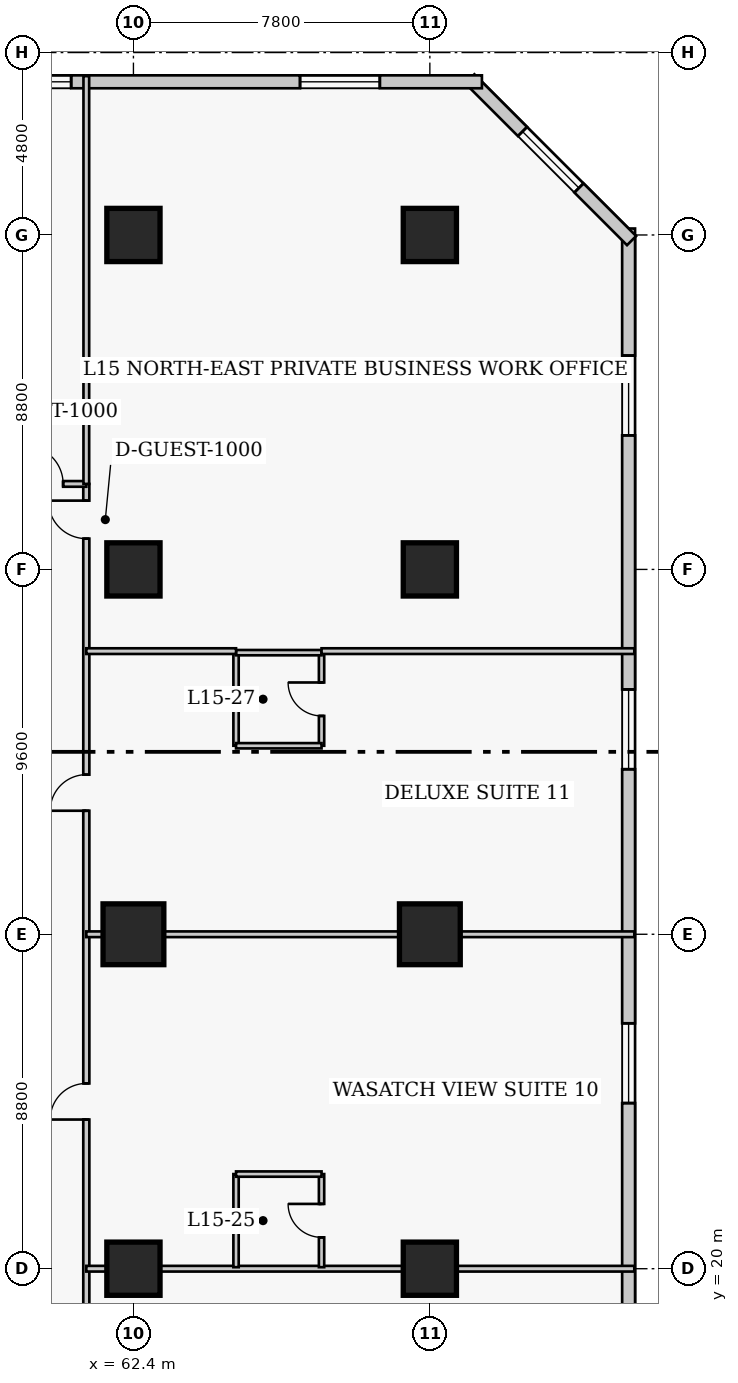
"""IFC4 building model, lengths in metres.
Left out: names, types, materials, properties, quantities, classifications, styles, units other than length and angle.
Written with IfcOpenShell. Run it as: python <this file> out.ifc"""

import sys

from ifc_helpers import new_model, si_unit, direction, frame, frame_2d, origin, origin_2d, place, context, subcontext, project, spatial, rectangle, extrude, element, fill, save


model = new_model("IFC4")
c1 = context("Model", 3, precision=1e-05, world=origin(), true_north=direction((0.0, 1.0)))
c2 = subcontext(c1, "Body", "Model", "MODEL_VIEW")
j1 = project(units=[si_unit("LENGTHUNIT", "METRE"), si_unit("PLANEANGLEUNIT", "RADIAN")], contexts=[c1])
p1 = place(None, origin())
s1 = spatial("IfcSite", under=j1, at=p1, CompositionType="ELEMENT")
p2 = place(p1, origin())
s2 = spatial("IfcBuilding", under=s1, at=p2, CompositionType="ELEMENT")
p3 = place(p2, frame((0.0, 0.0, 64.0)))
s3 = spatial("IfcBuildingStorey", under=s2, at=p3, CompositionType="ELEMENT", Elevation=64.0)
p4 = place(p3, frame((62.4, 20.0, 0.0), z_axis=(0.0, 0.0, 1.0), x_axis=(1.0, 0.0, 0.0)))
e1 = element("IfcColumn", 1, at=p4, inside=s3, PredefinedType="COLUMN", context=c2, shape_type="SweptSolid", body=[
    extrude(rectangle(XDim=1.4, YDim=1.4, at=origin_2d()), origin(), (0.0, 0.0, 1.0), 3.8),
])
p5 = place(p3, frame((62.4, 28.8, 0.0), z_axis=(0.0, 0.0, 1.0), x_axis=(1.0, 0.0, 0.0)))
e2 = element("IfcColumn", 2, at=p5, inside=s3, PredefinedType="COLUMN", context=c2, shape_type="SweptSolid", body=[
    extrude(rectangle(XDim=1.6, YDim=1.6, at=origin_2d()), origin(), (0.0, 0.0, 1.0), 3.8),
])
for number, where, z_axis, x_axis in (
    (3, (62.4, 38.4, 0.0), (0.0, 0.0, 1.0), (1.0, 0.0, 0.0)),
    (4, (62.4, 47.2, 0.0), (0.0, 0.0, 1.0), (1.0, 0.0, 0.0)),
    (5, (70.2, 20.0, 0.0), (0.0, 0.0, 1.0), (1.0, 0.0, 0.0)),
):
    element("IfcColumn", number, at=place(p3, frame(where, z_axis=z_axis, x_axis=x_axis)), inside=s3, PredefinedType="COLUMN", context=c2, shape_type="SweptSolid", body=[
        extrude(rectangle(XDim=1.4, YDim=1.4, at=origin_2d()), origin(), (0.0, 0.0, 1.0), 3.8),
    ])
p6 = place(p3, frame((70.2, 28.8, 0.0), z_axis=(0.0, 0.0, 1.0), x_axis=(1.0, 0.0, 0.0)))
e6 = element("IfcColumn", 6, at=p6, inside=s3, PredefinedType="COLUMN", context=c2, shape_type="SweptSolid", body=[
    extrude(rectangle(XDim=1.6, YDim=1.6, at=origin_2d()), origin(), (0.0, 0.0, 1.0), 3.8),
])
for number, where, z_axis, x_axis in (
    (7, (70.2, 38.4, 0.0), (0.0, 0.0, 1.0), (1.0, 0.0, 0.0)),
    (8, (70.2, 47.2, 0.0), (0.0, 0.0, 1.0), (1.0, 0.0, 0.0)),
):
    element("IfcColumn", number, at=place(p3, frame(where, z_axis=z_axis, x_axis=x_axis)), inside=s3, PredefinedType="COLUMN", context=c2, shape_type="SweptSolid", body=[
        extrude(rectangle(XDim=1.4, YDim=1.4, at=origin_2d()), origin(), (0.0, 0.0, 1.0), 3.8),
    ])
p7 = place(p3, frame((75.43, 12.23, 0.0), z_axis=(0.0, 0.0, 1.0), x_axis=(0.0, 1.0, 0.0)))
e9 = element("IfcWall", 9, at=p7, inside=s3, PredefinedType="SOLIDWALL", context=c2, shape_type="SweptSolid", body=[
    extrude(rectangle(XDim=35.14, YDim=0.34, at=frame_2d((17.57, 0.0))), origin(), (0.0, 0.0, 1.0), 3.54),
])
p8 = place(p7, frame((3.343, 0.0, 0.85)))
e10 = element("IfcOpeningElement", 10, at=p8, cuts=e9, PredefinedType="OPENING", context=c2, shape_type="SweptSolid", body=[
    extrude(rectangle(XDim=2.1, YDim=1.85, at=frame_2d((1.05, 0.925))), frame((0.0, 0.18, 0.0), z_axis=(0.0, -1.0, 0.0), x_axis=(1.0, 0.0, 0.0)), (0.0, 0.0, 1.0), 0.36),
])
p9 = place(p7, frame((12.127, 0.0, 0.85)))
e11 = element("IfcOpeningElement", 11, at=p9, cuts=e9, PredefinedType="OPENING", context=c2, shape_type="SweptSolid", body=[
    extrude(rectangle(XDim=2.1, YDim=1.85, at=frame_2d((1.05, 0.925))), frame((0.0, 0.18, 0.0), z_axis=(0.0, -1.0, 0.0), x_axis=(1.0, 0.0, 0.0)), (0.0, 0.0, 1.0), 0.36),
])
p10 = place(p7, frame((20.913, 0.0, 0.85)))
e12 = element("IfcOpeningElement", 12, at=p10, cuts=e9, PredefinedType="OPENING", context=c2, shape_type="SweptSolid", body=[
    extrude(rectangle(XDim=2.1, YDim=1.85, at=frame_2d((1.05, 0.925))), frame((0.0, 0.18, 0.0), z_axis=(0.0, -1.0, 0.0), x_axis=(1.0, 0.0, 0.0)), (0.0, 0.0, 1.0), 0.36),
])
p11 = place(p7, frame((29.698, 0.0, 0.85)))
e13 = element("IfcOpeningElement", 13, at=p11, cuts=e9, PredefinedType="OPENING", context=c2, shape_type="SweptSolid", body=[
    extrude(rectangle(XDim=2.1, YDim=1.85, at=frame_2d((1.05, 0.925))), frame((0.0, 0.18, 0.0), z_axis=(0.0, -1.0, 0.0), x_axis=(1.0, 0.0, 0.0)), (0.0, 0.0, 1.0), 0.36),
])
p12 = place(p3, frame((75.508, 47.052, 0.0), z_axis=(0.0, 0.0, 1.0), x_axis=(-0.707106781187, 0.707106781187, 0.0)))
e14 = element("IfcWall", 14, at=p12, inside=s3, PredefinedType="SOLIDWALL", context=c2, shape_type="SweptSolid", body=[
    extrude(rectangle(XDim=6.02, YDim=0.34, at=frame_2d((3.01, 0.0))), origin(), (0.0, 0.0, 1.0), 3.54),
])
p13 = place(p12, frame((1.96, 0.0, 0.85)))
e15 = element("IfcOpeningElement", 15, at=p13, cuts=e14, PredefinedType="OPENING", context=c2, shape_type="SweptSolid", body=[
    extrude(rectangle(XDim=2.1, YDim=1.85, at=frame_2d((1.05, 0.925))), frame((0.0, 0.18, 0.0), z_axis=(0.0, -1.0, 0.0), x_axis=(1.0, 0.0, 0.0)), (0.0, 0.0, 1.0), 0.36),
])
p14 = place(p3, frame((71.57, 51.23, 0.0), z_axis=(0.0, 0.0, 1.0), x_axis=(-1.0, 0.0, 0.0)))
e16 = element("IfcWall", 16, at=p14, inside=s3, PredefinedType="SOLIDWALL", context=c2, shape_type="SweptSolid", body=[
    extrude(rectangle(XDim=29.89, YDim=0.34, at=frame_2d((14.945, 0.0))), origin(), (0.0, 0.0, 1.0), 3.54),
])
p15 = place(p14, frame((2.686, 0.0, 0.85)))
e17 = element("IfcOpeningElement", 17, at=p15, cuts=e16, PredefinedType="OPENING", context=c2, shape_type="SweptSolid", body=[
    extrude(rectangle(XDim=2.1, YDim=1.85, at=frame_2d((1.05, 0.925))), frame((0.0, 0.18, 0.0), z_axis=(0.0, -1.0, 0.0), x_axis=(1.0, 0.0, 0.0)), (0.0, 0.0, 1.0), 0.36),
])
p16 = place(p14, frame((10.809, 0.0, 0.85)))
e18 = element("IfcOpeningElement", 18, at=p16, cuts=e16, PredefinedType="OPENING", context=c2, shape_type="SweptSolid", body=[
    extrude(rectangle(XDim=2.1, YDim=1.85, at=frame_2d((1.05, 0.925))), frame((0.0, 0.18, 0.0), z_axis=(0.0, -1.0, 0.0), x_axis=(1.0, 0.0, 0.0)), (0.0, 0.0, 1.0), 0.36),
])
p17 = place(p14, frame((17.631, 0.0, 0.85)))
e19 = element("IfcOpeningElement", 19, at=p17, cuts=e16, PredefinedType="OPENING", context=c2, shape_type="SweptSolid", body=[
    extrude(rectangle(XDim=2.1, YDim=1.85, at=frame_2d((1.05, 0.925))), frame((0.0, 0.18, 0.0), z_axis=(0.0, -1.0, 0.0), x_axis=(1.0, 0.0, 0.0)), (0.0, 0.0, 1.0), 0.36),
])
p18 = place(p14, frame((25.104, 0.0, 0.85)))
e20 = element("IfcOpeningElement", 20, at=p18, cuts=e16, PredefinedType="OPENING", context=c2, shape_type="SweptSolid", body=[
    extrude(rectangle(XDim=2.1, YDim=1.85, at=frame_2d((1.05, 0.925))), frame((0.0, 0.18, 0.0), z_axis=(0.0, -1.0, 0.0), x_axis=(1.0, 0.0, 0.0)), (0.0, 0.0, 1.0), 0.36),
])
p19 = place(p3, frame((61.16, 10.25, 0.0), z_axis=(0.0, 0.0, 1.0), x_axis=(0.0, 1.0, 0.0)))
e21 = element("IfcWall", 21, at=p19, inside=s3, PredefinedType="PARTITIONING", context=c2, shape_type="SweptSolid", body=[
    extrude(rectangle(XDim=30.4, YDim=0.16, at=frame_2d((15.2, 0.0))), origin(), (0.0, 0.0, 1.0), 3.54),
])
p20 = place(p19, frame((4.4, 0.0, 0.0)))
e22 = element("IfcOpeningElement", 22, at=p20, cuts=e21, PredefinedType="OPENING", context=c2, shape_type="SweptSolid", body=[
    extrude(rectangle(XDim=0.95, YDim=2.1, at=frame_2d((0.475, 1.05))), frame((0.0, 0.09, 0.0), z_axis=(0.0, -1.0, 0.0), x_axis=(1.0, 0.0, 0.0)), (0.0, 0.0, 1.0), 0.18),
])
p21 = place(p19, frame((13.675, 0.0, 0.0)))
e23 = element("IfcOpeningElement", 23, at=p21, cuts=e21, PredefinedType="OPENING", context=c2, shape_type="SweptSolid", body=[
    extrude(rectangle(XDim=0.95, YDim=2.1, at=frame_2d((0.475, 1.05))), frame((0.0, 0.09, 0.0), z_axis=(0.0, -1.0, 0.0), x_axis=(1.0, 0.0, 0.0)), (0.0, 0.0, 1.0), 0.18),
])
p22 = place(p19, frame((21.8, 0.0, 0.0)))
e24 = element("IfcOpeningElement", 24, at=p22, cuts=e21, PredefinedType="OPENING", context=c2, shape_type="SweptSolid", body=[
    extrude(rectangle(XDim=0.95, YDim=2.1, at=frame_2d((0.475, 1.05))), frame((0.0, 0.09, 0.0), z_axis=(0.0, -1.0, 0.0), x_axis=(1.0, 0.0, 0.0)), (0.0, 0.0, 1.0), 0.18),
])
p23 = place(p19, frame((28.96, 0.0, 0.0)))
e25 = element("IfcOpeningElement", 25, at=p23, cuts=e21, PredefinedType="OPENING", context=c2, shape_type="SweptSolid", body=[
    extrude(rectangle(XDim=1.0, YDim=2.15, at=frame_2d((0.5, 1.075))), frame((0.0, 0.09, 0.0), z_axis=(0.0, -1.0, 0.0), x_axis=(1.0, 0.0, 0.0)), (0.0, 0.0, 1.0), 0.18),
])
p24 = place(p3, frame((56.8, 40.65, 0.0), z_axis=(0.0, 0.0, 1.0), x_axis=(1.0, 0.0, 0.0)))
e26 = element("IfcWall", 26, at=p24, inside=s3, PredefinedType="PARTITIONING", context=c2, shape_type="SweptSolid", body=[
    extrude(rectangle(XDim=4.36, YDim=0.15, at=frame_2d((2.18, 0.0))), origin(), (0.0, 0.0, 1.0), 3.54),
])
p25 = place(p24, frame((2.75, 0.0, 0.0)))
e27 = element("IfcOpeningElement", 27, at=p25, cuts=e26, PredefinedType="OPENING", context=c2, shape_type="SweptSolid", body=[
    extrude(rectangle(XDim=1.0, YDim=2.15, at=frame_2d((0.5, 1.075))), frame((0.0, 0.085, 0.0), z_axis=(0.0, -1.0, 0.0), x_axis=(1.0, 0.0, 0.0)), (0.0, 0.0, 1.0), 0.17),
])
p26 = place(p3, frame((61.16, 40.65, 0.0), z_axis=(0.0, 0.0, 1.0), x_axis=(0.0, 1.0, 0.0)))
e28 = element("IfcWall", 28, at=p26, inside=s3, PredefinedType="PARTITIONING", context=c2, shape_type="SweptSolid", body=[
    extrude(rectangle(XDim=10.73, YDim=0.15, at=frame_2d((5.365, 0.0))), origin(), (0.0, 0.0, 1.0), 3.54),
])
p27 = place(p3, frame((61.16, 20.0, 0.0), z_axis=(0.0, 0.0, 1.0), x_axis=(1.0, 0.0, 0.0)))
e29 = element("IfcWall", 29, at=p27, inside=s3, PredefinedType="PARTITIONING", context=c2, shape_type="SweptSolid", body=[
    extrude(rectangle(XDim=14.42, YDim=0.15, at=frame_2d((7.21, 0.0))), origin(), (0.0, 0.0, 1.0), 2.593),
])
p28 = place(p3, frame((65.1, 20.04, 0.0), z_axis=(0.0, 0.0, 1.0), x_axis=(0.0, 1.0, 0.0)))
e30 = element("IfcWall", 30, at=p28, inside=s3, PredefinedType="PLUMBINGWALL", context=c2, shape_type="SweptSolid", body=[
    extrude(rectangle(XDim=2.45, YDim=0.14, at=frame_2d((1.225, 0.0))), origin(), (0.0, 0.0, 1.0), 3.54),
])
p29 = place(p3, frame((67.35, 20.04, 0.0), z_axis=(0.0, 0.0, 1.0), x_axis=(0.0, 1.0, 0.0)))
e31 = element("IfcWall", 31, at=p29, inside=s3, PredefinedType="PLUMBINGWALL", context=c2, shape_type="SweptSolid", body=[
    extrude(rectangle(XDim=2.45, YDim=0.14, at=frame_2d((1.225, 0.0))), origin(), (0.0, 0.0, 1.0), 3.54),
])
p30 = place(p29, frame((0.785, 0.0, 0.0)))
e32 = element("IfcOpeningElement", 32, at=p30, cuts=e31, PredefinedType="OPENING", context=c2, shape_type="SweptSolid", body=[
    extrude(rectangle(XDim=0.88, YDim=2.05, at=frame_2d((0.44, 1.025))), frame((0.0, 0.08, 0.0), z_axis=(0.0, -1.0, 0.0), x_axis=(1.0, 0.0, 0.0)), (0.0, 0.0, 1.0), 0.16),
])
p31 = place(p3, frame((65.1, 22.49, 0.0), z_axis=(0.0, 0.0, 1.0), x_axis=(1.0, 0.0, 0.0)))
e33 = element("IfcWall", 33, at=p31, inside=s3, PredefinedType="PLUMBINGWALL", context=c2, shape_type="SweptSolid", body=[
    extrude(rectangle(XDim=2.25, YDim=0.14, at=frame_2d((1.125, 0.0))), origin(), (0.0, 0.0, 1.0), 3.54),
])
p32 = place(p3, frame((61.16, 28.8, 0.0), z_axis=(0.0, 0.0, 1.0), x_axis=(1.0, 0.0, 0.0)))
e34 = element("IfcWall", 34, at=p32, inside=s3, PredefinedType="PARTITIONING", context=c2, shape_type="SweptSolid", body=[
    extrude(rectangle(XDim=14.42, YDim=0.15, at=frame_2d((7.21, 0.0))), origin(), (0.0, 0.0, 1.0), 2.593),
])
p33 = place(p3, frame((65.1, 33.76, 0.0), z_axis=(0.0, 0.0, 1.0), x_axis=(0.0, 1.0, 0.0)))
e35 = element("IfcWall", 35, at=p33, inside=s3, PredefinedType="PLUMBINGWALL", context=c2, shape_type="SweptSolid", body=[
    extrude(rectangle(XDim=2.45, YDim=0.14, at=frame_2d((1.225, 0.0))), origin(), (0.0, 0.0, 1.0), 3.54),
])
p34 = place(p3, frame((67.35, 33.76, 0.0), z_axis=(0.0, 0.0, 1.0), x_axis=(0.0, 1.0, 0.0)))
e36 = element("IfcWall", 36, at=p34, inside=s3, PredefinedType="PLUMBINGWALL", context=c2, shape_type="SweptSolid", body=[
    extrude(rectangle(XDim=2.45, YDim=0.14, at=frame_2d((1.225, 0.0))), origin(), (0.0, 0.0, 1.0), 3.54),
])
p35 = place(p34, frame((0.785, 0.0, 0.0)))
e37 = element("IfcOpeningElement", 37, at=p35, cuts=e36, PredefinedType="OPENING", context=c2, shape_type="SweptSolid", body=[
    extrude(rectangle(XDim=0.88, YDim=2.05, at=frame_2d((0.44, 1.025))), frame((0.0, 0.08, 0.0), z_axis=(0.0, -1.0, 0.0), x_axis=(1.0, 0.0, 0.0)), (0.0, 0.0, 1.0), 0.16),
])
for number, where, z_axis, x_axis in (
    (38, (65.1, 33.76, 0.0), (0.0, 0.0, 1.0), (1.0, 0.0, 0.0)),
    (39, (65.1, 36.21, 0.0), (0.0, 0.0, 1.0), (1.0, 0.0, 0.0)),
):
    element("IfcWall", number, at=place(p3, frame(where, z_axis=z_axis, x_axis=x_axis)), inside=s3, PredefinedType="PLUMBINGWALL", context=c2, shape_type="SweptSolid", body=[
        extrude(rectangle(XDim=2.25, YDim=0.14, at=frame_2d((1.125, 0.0))), origin(), (0.0, 0.0, 1.0), 3.54),
    ])
p36 = place(p3, frame((61.16, 36.25, 0.0), z_axis=(0.0, 0.0, 1.0), x_axis=(1.0, 0.0, 0.0)))
e40 = element("IfcWall", 40, at=p36, inside=s3, PredefinedType="PARTITIONING", context=c2, shape_type="SweptSolid", body=[
    extrude(rectangle(XDim=3.94, YDim=0.15, at=frame_2d((1.97, 0.0))), origin(), (0.0, 0.0, 1.0), 3.54),
])
p37 = place(p3, frame((67.35, 36.25, 0.0), z_axis=(0.0, 0.0, 1.0), x_axis=(1.0, 0.0, 0.0)))
e41 = element("IfcWall", 41, at=p37, inside=s3, PredefinedType="PARTITIONING", context=c2, shape_type="SweptSolid", body=[
    extrude(rectangle(XDim=8.23, YDim=0.15, at=frame_2d((4.115, 0.0))), origin(), (0.0, 0.0, 1.0), 3.54),
])
p38 = place(p9, origin())
e42 = element("IfcWindow", 42, at=p38, inside=s3, PartitioningType="SINGLE_PANEL", PredefinedType="WINDOW", context=c2, shape_type="SweptSolid", body=[
    extrude(rectangle(XDim=2.1, YDim=1.85, at=frame_2d((1.05, 0.925))), frame((0.0, 0.03, 0.0), z_axis=(0.0, -1.0, 0.0), x_axis=(1.0, 0.0, 0.0)), (0.0, 0.0, 1.0), 0.06),
])
fill(e11, e42)
p39 = place(p10, origin())
e43 = element("IfcWindow", 43, at=p39, inside=s3, PartitioningType="SINGLE_PANEL", PredefinedType="WINDOW", context=c2, shape_type="SweptSolid", body=[
    extrude(rectangle(XDim=2.1, YDim=1.85, at=frame_2d((1.05, 0.925))), frame((0.0, 0.03, 0.0), z_axis=(0.0, -1.0, 0.0), x_axis=(1.0, 0.0, 0.0)), (0.0, 0.0, 1.0), 0.06),
])
fill(e12, e43)
p40 = place(p11, origin())
e44 = element("IfcWindow", 44, at=p40, inside=s3, PartitioningType="SINGLE_PANEL", PredefinedType="WINDOW", context=c2, shape_type="SweptSolid", body=[
    extrude(rectangle(XDim=2.1, YDim=1.85, at=frame_2d((1.05, 0.925))), frame((0.0, 0.03, 0.0), z_axis=(0.0, -1.0, 0.0), x_axis=(1.0, 0.0, 0.0)), (0.0, 0.0, 1.0), 0.06),
])
fill(e13, e44)
p41 = place(p13, origin())
e45 = element("IfcWindow", 45, at=p41, inside=s3, PartitioningType="SINGLE_PANEL", PredefinedType="WINDOW", context=c2, shape_type="SweptSolid", body=[
    extrude(rectangle(XDim=2.1, YDim=1.85, at=frame_2d((1.05, 0.925))), frame((0.0, 0.03, 0.0), z_axis=(0.0, -1.0, 0.0), x_axis=(1.0, 0.0, 0.0)), (0.0, 0.0, 1.0), 0.06),
])
fill(e15, e45)
p42 = place(p15, origin())
e46 = element("IfcWindow", 46, at=p42, inside=s3, PartitioningType="SINGLE_PANEL", PredefinedType="WINDOW", context=c2, shape_type="SweptSolid", body=[
    extrude(rectangle(XDim=2.1, YDim=1.85, at=frame_2d((1.05, 0.925))), frame((0.0, 0.03, 0.0), z_axis=(0.0, -1.0, 0.0), x_axis=(1.0, 0.0, 0.0)), (0.0, 0.0, 1.0), 0.06),
])
fill(e17, e46)
p43 = place(p16, origin())
e47 = element("IfcWindow", 47, at=p43, inside=s3, PartitioningType="SINGLE_PANEL", PredefinedType="WINDOW", context=c2, shape_type="SweptSolid", body=[
    extrude(rectangle(XDim=2.1, YDim=1.85, at=frame_2d((1.05, 0.925))), frame((0.0, 0.03, 0.0), z_axis=(0.0, -1.0, 0.0), x_axis=(1.0, 0.0, 0.0)), (0.0, 0.0, 1.0), 0.06),
])
fill(e18, e47)
p44 = place(p25, origin())
e48 = element("IfcDoor", 48, at=p44, inside=s3, OperationType="SINGLE_SWING_LEFT", PredefinedType="DOOR", context=c2, shape_type="SweptSolid", body=[
    extrude(rectangle(XDim=1.0, YDim=2.15, at=frame_2d((0.5, 1.075))), frame((0.0, 0.025, 0.0), z_axis=(0.0, -1.0, 0.0), x_axis=(1.0, 0.0, 0.0)), (0.0, 0.0, 1.0), 0.05),
])
fill(e27, e48)
p45 = place(p30, origin())
e49 = element("IfcDoor", 49, at=p45, inside=s3, OperationType="SINGLE_SWING_RIGHT", PredefinedType="DOOR", context=c2, shape_type="SweptSolid", body=[
    extrude(rectangle(XDim=0.88, YDim=2.05, at=frame_2d((0.44, 1.025))), frame((0.0, 0.025, 0.0), z_axis=(0.0, -1.0, 0.0), x_axis=(1.0, 0.0, 0.0)), (0.0, 0.0, 1.0), 0.05),
])
fill(e32, e49)
p46 = place(p21, origin())
e50 = element("IfcDoor", 50, at=p46, inside=s3, OperationType="SINGLE_SWING_LEFT", PredefinedType="DOOR", context=c2, shape_type="SweptSolid", body=[
    extrude(rectangle(XDim=0.95, YDim=2.1, at=frame_2d((0.475, 1.05))), frame((0.0, 0.025, 0.0), z_axis=(0.0, -1.0, 0.0), x_axis=(1.0, 0.0, 0.0)), (0.0, 0.0, 1.0), 0.05),
])
fill(e23, e50)
p47 = place(p35, origin())
e51 = element("IfcDoor", 51, at=p47, inside=s3, OperationType="SINGLE_SWING_RIGHT", PredefinedType="DOOR", context=c2, shape_type="SweptSolid", body=[
    extrude(rectangle(XDim=0.88, YDim=2.05, at=frame_2d((0.44, 1.025))), frame((0.0, 0.025, 0.0), z_axis=(0.0, -1.0, 0.0), x_axis=(1.0, 0.0, 0.0)), (0.0, 0.0, 1.0), 0.05),
])
fill(e37, e51)
p48 = place(p22, origin())
e52 = element("IfcDoor", 52, at=p48, inside=s3, OperationType="SINGLE_SWING_LEFT", PredefinedType="DOOR", context=c2, shape_type="SweptSolid", body=[
    extrude(rectangle(XDim=0.95, YDim=2.1, at=frame_2d((0.475, 1.05))), frame((0.0, 0.025, 0.0), z_axis=(0.0, -1.0, 0.0), x_axis=(1.0, 0.0, 0.0)), (0.0, 0.0, 1.0), 0.05),
])
fill(e24, e52)
p49 = place(p23, origin())
e53 = element("IfcDoor", 53, at=p49, inside=s3, OperationType="SINGLE_SWING_RIGHT", PredefinedType="DOOR", context=c2, shape_type="SweptSolid", body=[
    extrude(rectangle(XDim=1.0, YDim=2.15, at=frame_2d((0.5, 1.075))), frame((0.0, 0.025, 0.0), z_axis=(0.0, -1.0, 0.0), x_axis=(1.0, 0.0, 0.0)), (0.0, 0.0, 1.0), 0.05),
])
fill(e25, e53)
save(model, sys.argv[1])
